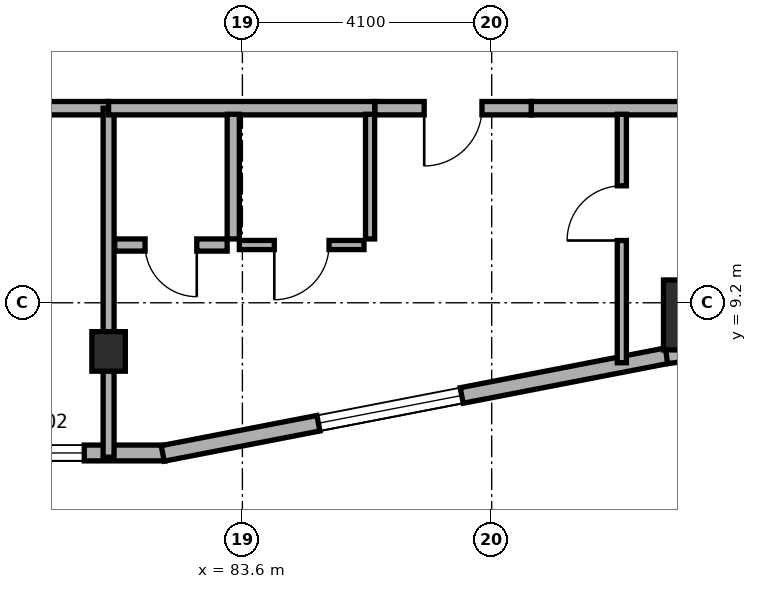
"""IFC4 building model, lengths in metres.
Left out: names, types, materials, properties, quantities, classifications, styles, units other than length and angle.
Written with IfcOpenShell. Run it as: python <this file> out.ifc"""

import sys

from ifc_helpers import new_model, si_unit, direction, frame, frame_2d, origin, origin_2d, place, context, subcontext, project, spatial, rectangle, extrude, element, fill, save


model = new_model("IFC4")
c1 = context("Model", 3, precision=1e-05, world=origin(), true_north=direction((0.0, 1.0)))
c2 = subcontext(c1, "Body", "Model", "MODEL_VIEW")
j1 = project(units=[si_unit("LENGTHUNIT", "METRE"), si_unit("PLANEANGLEUNIT", "RADIAN")], contexts=[c1])
p1 = place(None, origin())
s1 = spatial("IfcSite", under=j1, at=p1, CompositionType="ELEMENT")
p2 = place(p1, origin())
s2 = spatial("IfcBuilding", under=s1, at=p2, CompositionType="ELEMENT")
p3 = place(p2, frame((0.0, 0.0, 112.5)))
s3 = spatial("IfcBuildingStorey", under=s2, at=p3, CompositionType="ELEMENT", Elevation=112.5)
p4 = place(p3, frame((81.4, 8.4, 0.0), z_axis=(0.0, 0.0, 1.0), x_axis=(1.0, 0.0, 0.0)))
e1 = element("IfcColumn", 1, at=p4, inside=s3, PredefinedType="COLUMN", context=c2, shape_type="SweptSolid", body=[
    extrude(rectangle(XDim=0.55, YDim=0.65, at=origin_2d()), origin(), (0.0, 0.0, 1.0), 3.5),
])
p5 = place(p3, frame((91.0, 9.0, 0.0), z_axis=(0.0, 0.0, 1.0), x_axis=(1.0, 0.0, 0.0)))
e2 = element("IfcColumn", 2, at=p5, inside=s3, PredefinedType="COLUMN", context=c2, shape_type="SweptSolid", body=[
    extrude(rectangle(XDim=0.95, YDim=1.15, at=origin_2d()), origin(), (0.0, 0.0, 1.0), 3.5),
])
p6 = place(p3, frame((71.635, 6.73, 0.0), z_axis=(0.0, 0.0, 1.0), x_axis=(1.0, 0.0, 0.0)))
e3 = element("IfcWall", 3, at=p6, inside=s3, PredefinedType="STANDARD", context=c2, shape_type="SweptSolid", body=[
    extrude(rectangle(XDim=10.695, YDim=0.26, at=frame_2d((5.348, 0.0))), origin(), (0.0, 0.0, 1.0), 3.25),
])
p7 = place(p6, frame((4.765, 0.0, 0.0)))
e4 = element("IfcOpeningElement", 4, at=p7, cuts=e3, PredefinedType="OPENING", context=c2, shape_type="SweptSolid", body=[
    extrude(rectangle(XDim=1.2, YDim=2.15, at=frame_2d((0.6, 1.075))), frame((0.0, 0.14, 0.0), z_axis=(0.0, -1.0, 0.0), x_axis=(1.0, 0.0, 0.0)), (0.0, 0.0, 1.0), 0.28),
])
p8 = place(p6, frame((1.077, 0.0, 0.8)))
e5 = element("IfcOpeningElement", 5, at=p8, cuts=e3, PredefinedType="OPENING", context=c2, shape_type="SweptSolid", body=[
    extrude(rectangle(XDim=2.4, YDim=1.6, at=frame_2d((1.2, 0.8))), frame((0.0, 0.14, 0.0), z_axis=(0.0, -1.0, 0.0), x_axis=(1.0, 0.0, 0.0)), (0.0, 0.0, 1.0), 0.28),
])
p9 = place(p6, frame((7.865, 0.0, 0.85)))
e6 = element("IfcOpeningElement", 6, at=p9, cuts=e3, PredefinedType="OPENING", context=c2, shape_type="SweptSolid", body=[
    extrude(rectangle(XDim=1.5, YDim=1.5, at=frame_2d((0.75, 0.75))), frame((0.0, 0.14, 0.0), z_axis=(0.0, -1.0, 0.0), x_axis=(1.0, 0.0, 0.0)), (0.0, 0.0, 1.0), 0.28),
])
p10 = place(p3, frame((82.29, 6.723, 0.0), z_axis=(0.0, 0.0, 1.0), x_axis=(0.981733729692, 0.190260043057, 0.0)))
e7 = element("IfcWall", 7, at=p10, inside=s3, PredefinedType="STANDARD", context=c2, shape_type="SweptSolid", body=[
    extrude(rectangle(XDim=8.447, YDim=0.26, at=frame_2d((4.224, 0.0))), origin(), (0.0, 0.0, 1.0), 3.25),
])
p11 = place(p10, frame((2.608, 0.0, 0.8)))
e8 = element("IfcOpeningElement", 8, at=p11, cuts=e7, PredefinedType="OPENING", context=c2, shape_type="SweptSolid", body=[
    extrude(rectangle(XDim=2.4, YDim=1.6, at=frame_2d((1.2, 0.8))), frame((0.0, 0.14, 0.0), z_axis=(0.0, -1.0, 0.0), x_axis=(1.0, 0.0, 0.0)), (0.0, 0.0, 1.0), 0.28),
])
p12 = place(p3, frame((90.575, 8.328, 0.0), z_axis=(0.0, 0.0, 1.0), x_axis=(0.991300187529, 0.13162043232, 0.0)))
e9 = element("IfcWall", 9, at=p12, inside=s3, PredefinedType="STANDARD", context=c2, shape_type="SweptSolid", body=[
    extrude(rectangle(XDim=0.677, YDim=0.26, at=frame_2d((0.338, 0.0))), origin(), (0.0, 0.0, 1.0), 3.25),
])
p13 = place(p3, frame((74.72, 12.4, 0.0), z_axis=(0.0, 0.0, 1.0), x_axis=(1.0, 0.0, 0.0)))
e10 = element("IfcWall", 10, at=p13, inside=s3, PredefinedType="SOLIDWALL", context=c2, shape_type="SweptSolid", body=[
    extrude(rectangle(XDim=6.68, YDim=0.22, at=frame_2d((3.34, 0.0))), origin(), (0.0, 0.0, 1.0), 2.825),
])
p14 = place(p3, frame((81.4, 6.66, 0.0), z_axis=(0.0, 0.0, 1.0), x_axis=(0.0, 1.0, 0.0)))
e11 = element("IfcWall", 11, at=p14, inside=s3, PredefinedType="SOLIDWALL", context=c2, shape_type="SweptSolid", body=[
    extrude(rectangle(XDim=5.74, YDim=0.18, at=frame_2d((2.87, 0.0))), origin(), (0.0, 0.0, 1.0), 2.825),
])
p15 = place(p3, frame((81.4, 12.4, 0.0), z_axis=(0.0, 0.0, 1.0), x_axis=(1.0, 0.0, 0.0)))
e12 = element("IfcWall", 12, at=p15, inside=s3, PredefinedType="SOLIDWALL", context=c2, shape_type="SweptSolid", body=[
    extrude(rectangle(XDim=4.38, YDim=0.22, at=frame_2d((2.19, 0.0))), origin(), (0.0, 0.0, 1.0), 2.825),
])
p16 = place(p3, frame((88.35, 12.4, 0.0), z_axis=(0.0, 0.0, 1.0), x_axis=(1.0, 0.0, 0.0)))
e13 = element("IfcWall", 13, at=p16, inside=s3, PredefinedType="SOLIDWALL", context=c2, shape_type="SweptSolid", body=[
    extrude(rectangle(XDim=6.29, YDim=0.22, at=frame_2d((3.145, 0.0))), origin(), (0.0, 0.0, 1.0), 2.945),
])
p17 = place(p3, frame((85.78, 12.4, 0.0), z_axis=(0.0, 0.0, 1.0), x_axis=(1.0, 0.0, 0.0)))
e14 = element("IfcWall", 14, at=p17, inside=s3, PredefinedType="SOLIDWALL", context=c2, shape_type="SweptSolid", body=[
    extrude(rectangle(XDim=2.57, YDim=0.22, at=frame_2d((1.285, 0.0))), origin(), (0.0, 0.0, 1.0), 3.22),
])
p18 = place(p17, frame((0.81, 0.0, 0.0)))
e15 = element("IfcOpeningElement", 15, at=p18, cuts=e14, PredefinedType="OPENING", context=c2, shape_type="SweptSolid", body=[
    extrude(rectangle(XDim=0.95, YDim=2.1, at=frame_2d((0.475, 1.05))), frame((0.0, 0.12, 0.0), z_axis=(0.0, -1.0, 0.0), x_axis=(1.0, 0.0, 0.0)), (0.0, 0.0, 1.0), 0.24),
])
p19 = place(p3, frame((89.84, 8.214, 0.0), z_axis=(0.0, 0.0, 1.0), x_axis=(0.0, 1.0, 0.0)))
e16 = element("IfcWall", 16, at=p19, inside=s3, PredefinedType="PARTITIONING", context=c2, shape_type="SweptSolid", body=[
    extrude(rectangle(XDim=4.086, YDim=0.15, at=frame_2d((2.043, 0.0))), origin(), (0.0, 0.0, 1.0), 2.945),
])
p20 = place(p19, frame((2.01, 0.0, 0.0)))
e17 = element("IfcOpeningElement", 17, at=p20, cuts=e16, PredefinedType="OPENING", context=c2, shape_type="SweptSolid", body=[
    extrude(rectangle(XDim=0.9, YDim=2.1, at=frame_2d((0.45, 1.05))), frame((0.0, 0.085, 0.0), z_axis=(0.0, -1.0, 0.0), x_axis=(1.0, 0.0, 0.0)), (0.0, 0.0, 1.0), 0.17),
])
p21 = place(p3, frame((83.45, 10.25, 0.0), z_axis=(0.0, 0.0, 1.0), x_axis=(0.0, 1.0, 0.0)))
e18 = element("IfcWall", 18, at=p21, inside=s3, PredefinedType="PLUMBINGWALL", context=c2, shape_type="SweptSolid", body=[
    extrude(rectangle(XDim=2.05, YDim=0.2, at=frame_2d((1.025, 0.0))), origin(), (0.0, 0.0, 1.0), 3.22),
])
p22 = place(p3, frame((85.7, 10.25, 0.0), z_axis=(0.0, 0.0, 1.0), x_axis=(0.0, 1.0, 0.0)))
e19 = element("IfcWall", 19, at=p22, inside=s3, PredefinedType="PARTITIONING", context=c2, shape_type="SweptSolid", body=[
    extrude(rectangle(XDim=2.05, YDim=0.15, at=frame_2d((1.025, 0.0))), origin(), (0.0, 0.0, 1.0), 3.22),
])
p23 = place(p3, frame((81.5, 10.15, 0.0), z_axis=(0.0, 0.0, 1.0), x_axis=(1.0, 0.0, 0.0)))
e20 = element("IfcWall", 20, at=p23, inside=s3, PredefinedType="PLUMBINGWALL", context=c2, shape_type="SweptSolid", body=[
    extrude(rectangle(XDim=1.85, YDim=0.2, at=frame_2d((0.925, 0.0))), origin(), (0.0, 0.0, 1.0), 2.825),
])
p24 = place(p23, frame((0.5, 0.0, 0.0)))
e21 = element("IfcOpeningElement", 21, at=p24, cuts=e20, PredefinedType="OPENING", context=c2, shape_type="SweptSolid", body=[
    extrude(rectangle(XDim=0.85, YDim=2.1, at=frame_2d((0.425, 1.05))), frame((0.0, 0.11, 0.0), z_axis=(0.0, -1.0, 0.0), x_axis=(1.0, 0.0, 0.0)), (0.0, 0.0, 1.0), 0.22),
])
p25 = place(p3, frame((83.55, 10.15, 0.0), z_axis=(0.0, 0.0, 1.0), x_axis=(1.0, 0.0, 0.0)))
e22 = element("IfcWall", 22, at=p25, inside=s3, PredefinedType="PARTITIONING", context=c2, shape_type="SweptSolid", body=[
    extrude(rectangle(XDim=2.05, YDim=0.15, at=frame_2d((1.025, 0.0))), origin(), (0.0, 0.0, 1.0), 3.22),
])
p26 = place(p25, frame((0.575, 0.0, 0.0)))
e23 = element("IfcOpeningElement", 23, at=p26, cuts=e22, PredefinedType="OPENING", context=c2, shape_type="SweptSolid", body=[
    extrude(rectangle(XDim=0.9, YDim=2.1, at=frame_2d((0.45, 1.05))), frame((0.0, 0.085, 0.0), z_axis=(0.0, -1.0, 0.0), x_axis=(1.0, 0.0, 0.0)), (0.0, 0.0, 1.0), 0.17),
])
p27 = place(p9, origin())
e24 = element("IfcWindow", 24, at=p27, inside=s3, PartitioningType="SINGLE_PANEL", PredefinedType="WINDOW", context=c2, shape_type="SweptSolid", body=[
    extrude(rectangle(XDim=1.5, YDim=1.5, at=frame_2d((0.75, 0.75))), frame((0.0, 0.03, 0.0), z_axis=(0.0, -1.0, 0.0), x_axis=(1.0, 0.0, 0.0)), (0.0, 0.0, 1.0), 0.06),
])
fill(e6, e24)
p28 = place(p11, origin())
e25 = element("IfcWindow", 25, at=p28, inside=s3, PartitioningType="SINGLE_PANEL", PredefinedType="WINDOW", context=c2, shape_type="SweptSolid", body=[
    extrude(rectangle(XDim=2.4, YDim=1.6, at=frame_2d((1.2, 0.8))), frame((0.0, 0.03, 0.0), z_axis=(0.0, -1.0, 0.0), x_axis=(1.0, 0.0, 0.0)), (0.0, 0.0, 1.0), 0.06),
])
fill(e8, e25)
p29 = place(p18, frame((0.95, 0.0, 0.0), z_axis=(0.0, 0.0, 1.0), x_axis=(-1.0, 0.0, 0.0)))
e26 = element("IfcDoor", 26, at=p29, inside=s3, OperationType="SINGLE_SWING_RIGHT", PredefinedType="DOOR", context=c2, shape_type="SweptSolid", body=[
    extrude(rectangle(XDim=0.95, YDim=2.1, at=frame_2d((0.475, 1.05))), frame((0.0, 0.025, 0.0), z_axis=(0.0, -1.0, 0.0), x_axis=(1.0, 0.0, 0.0)), (0.0, 0.0, 1.0), 0.05),
])
fill(e15, e26)
p30 = place(p20, origin())
e27 = element("IfcDoor", 27, at=p30, inside=s3, OperationType="SINGLE_SWING_LEFT", PredefinedType="DOOR", context=c2, shape_type="SweptSolid", body=[
    extrude(rectangle(XDim=0.9, YDim=2.1, at=frame_2d((0.45, 1.05))), frame((0.0, 0.025, 0.0), z_axis=(0.0, -1.0, 0.0), x_axis=(1.0, 0.0, 0.0)), (0.0, 0.0, 1.0), 0.05),
])
fill(e17, e27)
p31 = place(p24, frame((0.85, 0.0, 0.0), z_axis=(0.0, 0.0, 1.0), x_axis=(-1.0, 0.0, 0.0)))
e28 = element("IfcDoor", 28, at=p31, inside=s3, OperationType="SINGLE_SWING_LEFT", PredefinedType="DOOR", context=c2, shape_type="SweptSolid", body=[
    extrude(rectangle(XDim=0.85, YDim=2.1, at=frame_2d((0.425, 1.05))), frame((0.0, 0.025, 0.0), z_axis=(0.0, -1.0, 0.0), x_axis=(1.0, 0.0, 0.0)), (0.0, 0.0, 1.0), 0.05),
])
fill(e21, e28)
p32 = place(p26, frame((0.9, 0.0, 0.0), z_axis=(0.0, 0.0, 1.0), x_axis=(-1.0, 0.0, 0.0)))
e29 = element("IfcDoor", 29, at=p32, inside=s3, OperationType="SINGLE_SWING_RIGHT", PredefinedType="DOOR", context=c2, shape_type="SweptSolid", body=[
    extrude(rectangle(XDim=0.9, YDim=2.1, at=frame_2d((0.45, 1.05))), frame((0.0, 0.025, 0.0), z_axis=(0.0, -1.0, 0.0), x_axis=(1.0, 0.0, 0.0)), (0.0, 0.0, 1.0), 0.05),
])
fill(e23, e29)
save(model, sys.argv[1])
